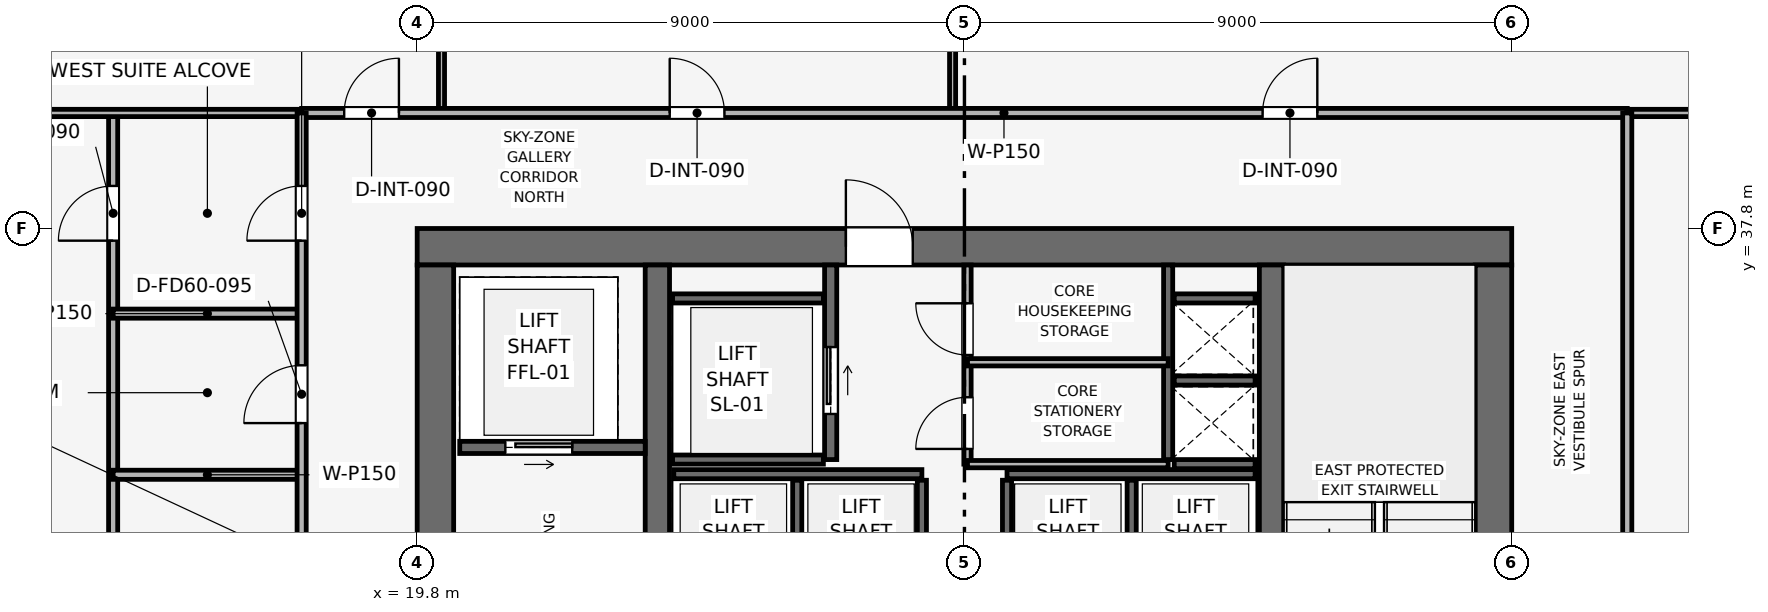
"""IFC4 building model, lengths in metres.
Left out: names, types, materials, properties, quantities, classifications, styles, units other than length and angle.
Written with IfcOpenShell. Run it as: python <this file> out.ifc"""

import sys

from ifc_helpers import new_model, si_unit, direction, frame, frame_2d, origin, place, context, subcontext, project, spatial, rectangle, extrude, element, fill, save


model = new_model("IFC4")
c1 = context("Model", 3, precision=1e-05, world=origin(), true_north=direction((0.0, 1.0)))
c2 = subcontext(c1, "Body", "Model", "MODEL_VIEW")
j1 = project(units=[si_unit("LENGTHUNIT", "METRE"), si_unit("PLANEANGLEUNIT", "RADIAN")], contexts=[c1])
p1 = place(None, origin())
s1 = spatial("IfcSite", under=j1, at=p1, CompositionType="ELEMENT")
p2 = place(p1, origin())
s2 = spatial("IfcBuilding", under=s1, at=p2, CompositionType="ELEMENT")
p3 = place(p2, frame((0.0, 0.0, 329.25)))
s3 = spatial("IfcBuildingStorey", under=s2, at=p3, CompositionType="ELEMENT", Elevation=329.25)
p4 = place(p3, frame((19.8, 37.5, 0.0), z_axis=(0.0, 0.0, 1.0), x_axis=(1.0, 0.0, 0.0)))
e1 = element("IfcWall", 1, at=p4, inside=s3, PredefinedType="SHEAR", context=c2, shape_type="SweptSolid", body=[
    extrude(rectangle(XDim=18.0, YDim=0.6, at=frame_2d((9.0, 0.0))), origin(), (0.0, 0.0, 1.0), 3.75),
])
p5 = place(p4, frame((7.05, 0.0, 0.0)))
e2 = element("IfcOpeningElement", 2, at=p5, cuts=e1, PredefinedType="OPENING", context=c2, shape_type="SweptSolid", body=[
    extrude(rectangle(XDim=1.1, YDim=2.15, at=frame_2d((0.55, 1.075))), frame((0.0, 0.31, 0.0), z_axis=(0.0, -1.0, 0.0), x_axis=(1.0, 0.0, 0.0)), (0.0, 0.0, 1.0), 0.62),
])
p6 = place(p3, frame((20.1, 20.4, 0.0), z_axis=(0.0, 0.0, 1.0), x_axis=(0.0, 1.0, 0.0)))
e3 = element("IfcWall", 3, at=p6, inside=s3, PredefinedType="SHEAR", context=c2, shape_type="SweptSolid", body=[
    extrude(rectangle(XDim=16.8, YDim=0.6, at=frame_2d((8.4, 0.0))), origin(), (0.0, 0.0, 1.0), 3.75),
])
p7 = place(p6, frame((10.4, 0.0, 0.0)))
e4 = element("IfcOpeningElement", 4, at=p7, cuts=e3, PredefinedType="OPENING", context=c2, shape_type="SweptSolid", body=[
    extrude(rectangle(XDim=1.1, YDim=2.15, at=frame_2d((0.55, 1.075))), frame((0.0, 0.31, 0.0), z_axis=(0.0, -1.0, 0.0), x_axis=(1.0, 0.0, 0.0)), (0.0, 0.0, 1.0), 0.62),
])
p8 = place(p3, frame((37.5, 20.4, 0.0), z_axis=(0.0, 0.0, 1.0), x_axis=(0.0, 1.0, 0.0)))
e5 = element("IfcWall", 5, at=p8, inside=s3, PredefinedType="SHEAR", context=c2, shape_type="SweptSolid", body=[
    extrude(rectangle(XDim=16.8, YDim=0.6, at=frame_2d((8.4, 0.0))), origin(), (0.0, 0.0, 1.0), 3.75),
])
p9 = place(p8, frame((4.9, 0.0, 0.0)))
e6 = element("IfcOpeningElement", 6, at=p9, cuts=e5, PredefinedType="OPENING", context=c2, shape_type="SweptSolid", body=[
    extrude(rectangle(XDim=1.1, YDim=2.15, at=frame_2d((0.55, 1.075))), frame((0.0, 0.31, 0.0), z_axis=(0.0, -1.0, 0.0), x_axis=(1.0, 0.0, 0.0)), (0.0, 0.0, 1.0), 0.62),
])
for number, where, z_axis, x_axis in (
    (7, (23.75, 20.4, 0.0), (0.0, 0.0, 1.0), (0.0, 1.0, 0.0)),
    (8, (33.85, 20.4, 0.0), (0.0, 0.0, 1.0), (0.0, 1.0, 0.0)),
):
    element("IfcWall", number, at=place(p3, frame(where, z_axis=z_axis, x_axis=x_axis)), inside=s3, PredefinedType="SHEAR", context=c2, shape_type="SweptSolid", body=[
        extrude(rectangle(XDim=16.8, YDim=0.4, at=frame_2d((8.4, 0.0))), origin(), (0.0, 0.0, 1.0), 3.75),
    ])
p10 = place(p3, frame((32.15, 34.0, 0.0), z_axis=(0.0, 0.0, 1.0), x_axis=(0.0, 1.0, 0.0)))
e9 = element("IfcWall", 9, at=p10, inside=s3, PredefinedType="SHEAR", context=c2, shape_type="SweptSolid", body=[
    extrude(rectangle(XDim=3.2, YDim=0.15, at=frame_2d((1.6, 0.0))), origin(), (0.0, 0.0, 1.0), 3.51),
])
for number, where, z_axis, x_axis in (
    (10, (32.25, 33.925, 0.0), (0.0, 0.0, 1.0), (1.0, 0.0, 0.0)),
    (11, (32.25, 35.3, 0.0), (0.0, 0.0, 1.0), (1.0, 0.0, 0.0)),
):
    element("IfcWall", number, at=place(p3, frame(where, z_axis=z_axis, x_axis=x_axis)), inside=s3, PredefinedType="SHEAR", context=c2, shape_type="SweptSolid", body=[
        extrude(rectangle(XDim=1.33, YDim=0.15, at=frame_2d((0.665, 0.0))), origin(), (0.0, 0.0, 1.0), 3.51),
    ])
p11 = place(p3, frame((20.5, 34.2, 0.0), z_axis=(0.0, 0.0, 1.0), x_axis=(1.0, 0.0, 0.0)))
e12 = element("IfcWall", 12, at=p11, inside=s3, PredefinedType="SHEAR", context=c2, shape_type="SweptSolid", body=[
    extrude(rectangle(XDim=3.05, YDim=0.2, at=frame_2d((1.525, 0.0))), origin(), (0.0, 0.0, 1.0), 3.51),
])
p12 = place(p11, frame((0.75, 0.0, 0.0)))
e13 = element("IfcOpeningElement", 13, at=p12, cuts=e12, PredefinedType="OPENING", context=c2, shape_type="SweptSolid", body=[
    extrude(rectangle(XDim=1.1, YDim=2.15, at=frame_2d((0.55, 1.075))), frame((0.0, 0.11, 0.0), z_axis=(0.0, -1.0, 0.0), x_axis=(1.0, 0.0, 0.0)), (0.0, 0.0, 1.0), 0.22),
])
p13 = place(p3, frame((26.6, 34.0, 0.0), z_axis=(0.0, 0.0, 1.0), x_axis=(0.0, 1.0, 0.0)))
e14 = element("IfcWall", 14, at=p13, inside=s3, PredefinedType="SHEAR", context=c2, shape_type="SweptSolid", body=[
    extrude(rectangle(XDim=3.2, YDim=0.2, at=frame_2d((1.6, 0.0))), origin(), (0.0, 0.0, 1.0), 3.51),
])
p14 = place(p13, frame((0.75, 0.0, 0.0)))
e15 = element("IfcOpeningElement", 15, at=p14, cuts=e14, PredefinedType="OPENING", context=c2, shape_type="SweptSolid", body=[
    extrude(rectangle(XDim=1.1, YDim=2.15, at=frame_2d((0.55, 1.075))), frame((0.0, 0.11, 0.0), z_axis=(0.0, -1.0, 0.0), x_axis=(1.0, 0.0, 0.0)), (0.0, 0.0, 1.0), 0.22),
])
for number, where, z_axis, x_axis in (
    (16, (24.0, 34.0, 0.0), (0.0, 0.0, 1.0), (1.0, 0.0, 0.0)),
    (17, (24.0, 36.65, 0.0), (0.0, 0.0, 1.0), (1.0, 0.0, 0.0)),
):
    element("IfcWall", number, at=place(p3, frame(where, z_axis=z_axis, x_axis=x_axis)), inside=s3, PredefinedType="SHEAR", context=c2, shape_type="SweptSolid", body=[
        extrude(rectangle(XDim=2.48, YDim=0.15, at=frame_2d((1.24, 0.0))), origin(), (0.0, 0.0, 1.0), 3.51),
    ])
p15 = place(p3, frame((32.25, 36.65, 0.0), z_axis=(0.0, 0.0, 1.0), x_axis=(1.0, 0.0, 0.0)))
e18 = element("IfcWall", 18, at=p15, inside=s3, PredefinedType="SHEAR", context=c2, shape_type="SweptSolid", body=[
    extrude(rectangle(XDim=1.33, YDim=0.15, at=frame_2d((0.665, 0.0))), origin(), (0.0, 0.0, 1.0), 3.51),
])
for number, where, z_axis, x_axis in (
    (19, (24.02, 33.76, 0.0), (0.0, 0.0, 1.0), (1.0, 0.0, 0.0)),
    (20, (29.5, 33.76, 0.0), (0.0, 0.0, 1.0), (1.0, 0.0, 0.0)),
):
    element("IfcWall", number, at=place(p3, frame(where, z_axis=z_axis, x_axis=x_axis)), inside=s3, PredefinedType="SHEAR", context=c2, shape_type="SweptSolid", body=[
        extrude(rectangle(XDim=4.08, YDim=0.15, at=frame_2d((2.04, 0.0))), origin(), (0.0, 0.0, 1.0), 3.51),
    ])
for number, where, z_axis, x_axis in (
    (21, (26.05, 31.42, 0.0), (0.0, 0.0, 1.0), (0.0, 1.0, 0.0)),
    (22, (28.1, 31.42, 0.0), (0.0, 0.0, 1.0), (0.0, 1.0, 0.0)),
    (23, (29.5, 31.42, 0.0), (0.0, 0.0, 1.0), (0.0, 1.0, 0.0)),
    (24, (31.55, 31.42, 0.0), (0.0, 0.0, 1.0), (0.0, 1.0, 0.0)),
):
    element("IfcWall", number, at=place(p3, frame(where, z_axis=z_axis, x_axis=x_axis)), inside=s3, PredefinedType="SHEAR", context=c2, shape_type="SweptSolid", body=[
        extrude(rectangle(XDim=2.24, YDim=0.15, at=frame_2d((1.12, 0.0))), origin(), (0.0, 0.0, 1.0), 3.51),
    ])
p16 = place(p3, frame((28.85, 33.925, 0.0), z_axis=(0.0, 0.0, 1.0), x_axis=(0.0, 1.0, 0.0)))
e25 = element("IfcWall", 25, at=p16, inside=s3, PredefinedType="PARTITIONING", context=c2, shape_type="SweptSolid", body=[
    extrude(rectangle(XDim=3.275, YDim=0.12, at=frame_2d((1.637, 0.0))), origin(), (0.0, 0.0, 1.0), 3.51),
])
p17 = place(p16, frame((0.25, 0.0, 0.0)))
e26 = element("IfcOpeningElement", 26, at=p17, cuts=e25, PredefinedType="OPENING", context=c2, shape_type="SweptSolid", body=[
    extrude(rectangle(XDim=0.85, YDim=2.1, at=frame_2d((0.425, 1.05))), frame((0.0, 0.07, 0.0), z_axis=(0.0, -1.0, 0.0), x_axis=(1.0, 0.0, 0.0)), (0.0, 0.0, 1.0), 0.14),
])
p18 = place(p16, frame((1.795, 0.0, 0.0)))
e27 = element("IfcOpeningElement", 27, at=p18, cuts=e25, PredefinedType="OPENING", context=c2, shape_type="SweptSolid", body=[
    extrude(rectangle(XDim=0.85, YDim=2.1, at=frame_2d((0.425, 1.05))), frame((0.0, 0.07, 0.0), z_axis=(0.0, -1.0, 0.0), x_axis=(1.0, 0.0, 0.0)), (0.0, 0.0, 1.0), 0.14),
])
for number, where, z_axis, x_axis in (
    (28, (28.85, 35.6, 0.0), (0.0, 0.0, 1.0), (1.0, 0.0, 0.0)),
    (29, (28.85, 33.925, 0.0), (0.0, 0.0, 1.0), (1.0, 0.0, 0.0)),
):
    element("IfcWall", number, at=place(p3, frame(where, z_axis=z_axis, x_axis=x_axis)), inside=s3, PredefinedType="PARTITIONING", context=c2, shape_type="SweptSolid", body=[
        extrude(rectangle(XDim=3.3, YDim=0.12, at=frame_2d((1.65, 0.0))), origin(), (0.0, 0.0, 1.0), 3.51),
    ])
for number, where, z_axis, x_axis in (
    (30, (20.2, 39.7, 0.0), (0.0, 0.0, 1.0), (0.0, 1.0, 0.0)),
    (31, (28.605, 39.7, 0.0), (0.0, 0.0, 1.0), (0.0, 1.0, 0.0)),
):
    element("IfcWall", number, at=place(p3, frame(where, z_axis=z_axis, x_axis=x_axis)), inside=s3, PredefinedType="MOVABLE", context=c2, shape_type="SweptSolid", body=[
        extrude(rectangle(XDim=11.77, YDim=0.1, at=frame_2d((5.885, 0.0))), origin(), (0.0, 0.0, 1.0), 3.095),
    ])
p19 = place(p3, frame((14.8, 28.0, 0.0), z_axis=(0.0, 0.0, 1.0), x_axis=(0.0, 1.0, 0.0)))
e32 = element("IfcWall", 32, at=p19, inside=s3, PredefinedType="PARTITIONING", context=c2, shape_type="SweptSolid", body=[
    extrude(rectangle(XDim=11.7, YDim=0.15, at=frame_2d((5.85, 0.0))), origin(), (0.0, 0.0, 1.0), 3.095),
])
p20 = place(p19, frame((9.6, 0.0, 0.0)))
e33 = element("IfcOpeningElement", 33, at=p20, cuts=e32, PredefinedType="OPENING", context=c2, shape_type="SweptSolid", body=[
    extrude(rectangle(XDim=0.9, YDim=2.1, at=frame_2d((0.45, 1.05))), frame((0.0, 0.085, 0.0), z_axis=(0.0, -1.0, 0.0), x_axis=(1.0, 0.0, 0.0)), (0.0, 0.0, 1.0), 0.17),
])
for number, where, z_axis, x_axis in (
    (34, (14.8, 36.4, 0.0), (0.0, 0.0, 1.0), (1.0, 0.0, 0.0)),
    (35, (14.8, 33.75, 0.0), (0.0, 0.0, 1.0), (1.0, 0.0, 0.0)),
):
    element("IfcWall", number, at=place(p3, frame(where, z_axis=z_axis, x_axis=x_axis)), inside=s3, PredefinedType="PARTITIONING", context=c2, shape_type="SweptSolid", body=[
        extrude(rectangle(XDim=3.1, YDim=0.15, at=frame_2d((1.55, 0.0))), origin(), (0.0, 0.0, 1.0), 3.135),
    ])
for number, where, z_axis, x_axis in (
    (36, (6.13, 39.7, 0.0), (0.0, 0.0, 1.0), (1.0, 0.0, 0.0)),
    (37, (39.7, 39.7, 0.0), (0.0, 0.0, 1.0), (1.0, 0.0, 0.0)),
):
    element("IfcWall", number, at=place(p3, frame(where, z_axis=z_axis, x_axis=x_axis)), inside=s3, PredefinedType="PARTITIONING", context=c2, shape_type="SweptSolid", body=[
        extrude(rectangle(XDim=11.77, YDim=0.12, at=frame_2d((5.885, 0.0))), origin(), (0.0, 0.0, 1.0), 3.095),
    ])
p21 = place(p3, frame((17.9, 39.7, 0.0), z_axis=(0.0, 0.0, 1.0), x_axis=(1.0, 0.0, 0.0)))
e38 = element("IfcWall", 38, at=p21, inside=s3, PredefinedType="PARTITIONING", context=c2, shape_type="SweptSolid", body=[
    extrude(rectangle(XDim=21.8, YDim=0.15, at=frame_2d((10.9, 0.0))), origin(), (0.0, 0.0, 1.0), 3.095),
])
p22 = place(p21, frame((0.7, 0.0, 0.0)))
e39 = element("IfcOpeningElement", 39, at=p22, cuts=e38, PredefinedType="OPENING", context=c2, shape_type="SweptSolid", body=[
    extrude(rectangle(XDim=0.9, YDim=2.1, at=frame_2d((0.45, 1.05))), frame((0.0, 0.085, 0.0), z_axis=(0.0, -1.0, 0.0), x_axis=(1.0, 0.0, 0.0)), (0.0, 0.0, 1.0), 0.17),
])
p23 = place(p21, frame((6.053, 0.0, 0.0)))
e40 = element("IfcOpeningElement", 40, at=p23, cuts=e38, PredefinedType="OPENING", context=c2, shape_type="SweptSolid", body=[
    extrude(rectangle(XDim=0.9, YDim=2.1, at=frame_2d((0.45, 1.05))), frame((0.0, 0.085, 0.0), z_axis=(0.0, -1.0, 0.0), x_axis=(1.0, 0.0, 0.0)), (0.0, 0.0, 1.0), 0.17),
])
p24 = place(p21, frame((15.803, 0.0, 0.0)))
e41 = element("IfcOpeningElement", 41, at=p24, cuts=e38, PredefinedType="OPENING", context=c2, shape_type="SweptSolid", body=[
    extrude(rectangle(XDim=0.9, YDim=2.1, at=frame_2d((0.45, 1.05))), frame((0.0, 0.085, 0.0), z_axis=(0.0, -1.0, 0.0), x_axis=(1.0, 0.0, 0.0)), (0.0, 0.0, 1.0), 0.17),
])
p25 = place(p3, frame((17.9, 12.3, 0.0), z_axis=(0.0, 0.0, 1.0), x_axis=(0.0, 1.0, 0.0)))
e42 = element("IfcWall", 42, at=p25, inside=s3, PredefinedType="PARTITIONING", context=c2, shape_type="SweptSolid", body=[
    extrude(rectangle(XDim=27.4, YDim=0.15, at=frame_2d((13.7, 0.0))), origin(), (0.0, 0.0, 1.0), 3.095),
])
p26 = place(p25, frame((2.365, 0.0, 0.0)))
e43 = element("IfcOpeningElement", 43, at=p26, cuts=e42, PredefinedType="OPENING", context=c2, shape_type="SweptSolid", body=[
    extrude(rectangle(XDim=0.9, YDim=2.1, at=frame_2d((0.45, 1.05))), frame((0.0, 0.085, 0.0), z_axis=(0.0, -1.0, 0.0), x_axis=(1.0, 0.0, 0.0)), (0.0, 0.0, 1.0), 0.17),
])
p27 = place(p25, frame((10.215, 0.0, 0.0)))
e44 = element("IfcOpeningElement", 44, at=p27, cuts=e42, PredefinedType="OPENING", context=c2, shape_type="SweptSolid", body=[
    extrude(rectangle(XDim=0.9, YDim=2.1, at=frame_2d((0.45, 1.05))), frame((0.0, 0.085, 0.0), z_axis=(0.0, -1.0, 0.0), x_axis=(1.0, 0.0, 0.0)), (0.0, 0.0, 1.0), 0.17),
])
p28 = place(p25, frame((16.65, 0.0, 0.0)))
e45 = element("IfcOpeningElement", 45, at=p28, cuts=e42, PredefinedType="OPENING", context=c2, shape_type="SweptSolid", body=[
    extrude(rectangle(XDim=0.9, YDim=2.1, at=frame_2d((0.45, 1.05))), frame((0.0, 0.085, 0.0), z_axis=(0.0, -1.0, 0.0), x_axis=(1.0, 0.0, 0.0)), (0.0, 0.0, 1.0), 0.17),
])
p29 = place(p25, frame((19.55, 0.0, 0.0)))
e46 = element("IfcOpeningElement", 46, at=p29, cuts=e42, PredefinedType="OPENING", context=c2, shape_type="SweptSolid", body=[
    extrude(rectangle(XDim=0.9, YDim=2.1, at=frame_2d((0.45, 1.05))), frame((0.0, 0.085, 0.0), z_axis=(0.0, -1.0, 0.0), x_axis=(1.0, 0.0, 0.0)), (0.0, 0.0, 1.0), 0.17),
])
p30 = place(p25, frame((22.3, 0.0, 0.0)))
e47 = element("IfcOpeningElement", 47, at=p30, cuts=e42, PredefinedType="OPENING", context=c2, shape_type="SweptSolid", body=[
    extrude(rectangle(XDim=0.95, YDim=2.1, at=frame_2d((0.475, 1.05))), frame((0.0, 0.085, 0.0), z_axis=(0.0, -1.0, 0.0), x_axis=(1.0, 0.0, 0.0)), (0.0, 0.0, 1.0), 0.17),
])
p31 = place(p25, frame((25.3, 0.0, 0.0)))
e48 = element("IfcOpeningElement", 48, at=p31, cuts=e42, PredefinedType="OPENING", context=c2, shape_type="SweptSolid", body=[
    extrude(rectangle(XDim=0.9, YDim=2.1, at=frame_2d((0.45, 1.05))), frame((0.0, 0.085, 0.0), z_axis=(0.0, -1.0, 0.0), x_axis=(1.0, 0.0, 0.0)), (0.0, 0.0, 1.0), 0.17),
])
p32 = place(p3, frame((39.7, 24.4, 0.0), z_axis=(0.0, 0.0, 1.0), x_axis=(0.0, 1.0, 0.0)))
e49 = element("IfcWall", 49, at=p32, inside=s3, PredefinedType="PARTITIONING", context=c2, shape_type="SweptSolid", body=[
    extrude(rectangle(XDim=15.3, YDim=0.15, at=frame_2d((7.65, 0.0))), origin(), (0.0, 0.0, 1.0), 3.095),
])
p33 = place(p32, frame((7.2, 0.0, 0.0)))
e50 = element("IfcOpeningElement", 50, at=p33, cuts=e49, PredefinedType="OPENING", context=c2, shape_type="SweptSolid", body=[
    extrude(rectangle(XDim=0.9, YDim=2.1, at=frame_2d((0.45, 1.05))), frame((0.0, 0.085, 0.0), z_axis=(0.0, -1.0, 0.0), x_axis=(1.0, 0.0, 0.0)), (0.0, 0.0, 1.0), 0.17),
])
p34 = place(p12, origin())
e51 = element("IfcDoor", 51, at=p34, inside=s3, OperationType="SLIDING_TO_RIGHT", PredefinedType="DOOR", context=c2, shape_type="SweptSolid", body=[
    extrude(rectangle(XDim=1.1, YDim=2.15, at=frame_2d((0.55, 1.075))), frame((0.0, 0.025, 0.0), z_axis=(0.0, -1.0, 0.0), x_axis=(1.0, 0.0, 0.0)), (0.0, 0.0, 1.0), 0.05),
])
fill(e13, e51)
p35 = place(p14, origin())
e52 = element("IfcDoor", 52, at=p35, inside=s3, OperationType="SLIDING_TO_RIGHT", PredefinedType="DOOR", context=c2, shape_type="SweptSolid", body=[
    extrude(rectangle(XDim=1.1, YDim=2.15, at=frame_2d((0.55, 1.075))), frame((0.0, 0.025, 0.0), z_axis=(0.0, -1.0, 0.0), x_axis=(1.0, 0.0, 0.0)), (0.0, 0.0, 1.0), 0.05),
])
fill(e15, e52)
p36 = place(p17, origin())
e53 = element("IfcDoor", 53, at=p36, inside=s3, OperationType="SINGLE_SWING_LEFT", PredefinedType="DOOR", context=c2, shape_type="SweptSolid", body=[
    extrude(rectangle(XDim=0.85, YDim=2.1, at=frame_2d((0.425, 1.05))), frame((0.0, 0.025, 0.0), z_axis=(0.0, -1.0, 0.0), x_axis=(1.0, 0.0, 0.0)), (0.0, 0.0, 1.0), 0.05),
])
fill(e26, e53)
p37 = place(p18, origin())
e54 = element("IfcDoor", 54, at=p37, inside=s3, OperationType="SINGLE_SWING_RIGHT", PredefinedType="DOOR", context=c2, shape_type="SweptSolid", body=[
    extrude(rectangle(XDim=0.85, YDim=2.1, at=frame_2d((0.425, 1.05))), frame((0.0, 0.025, 0.0), z_axis=(0.0, -1.0, 0.0), x_axis=(1.0, 0.0, 0.0)), (0.0, 0.0, 1.0), 0.05),
])
fill(e27, e54)
p38 = place(p20, origin())
e55 = element("IfcDoor", 55, at=p38, inside=s3, OperationType="SINGLE_SWING_LEFT", PredefinedType="DOOR", context=c2, shape_type="SweptSolid", body=[
    extrude(rectangle(XDim=0.9, YDim=2.1, at=frame_2d((0.45, 1.05))), frame((0.0, 0.025, 0.0), z_axis=(0.0, -1.0, 0.0), x_axis=(1.0, 0.0, 0.0)), (0.0, 0.0, 1.0), 0.05),
])
fill(e33, e55)
p39 = place(p22, origin())
e56 = element("IfcDoor", 56, at=p39, inside=s3, OperationType="SINGLE_SWING_RIGHT", PredefinedType="DOOR", context=c2, shape_type="SweptSolid", body=[
    extrude(rectangle(XDim=0.9, YDim=2.1, at=frame_2d((0.45, 1.05))), frame((0.0, 0.025, 0.0), z_axis=(0.0, -1.0, 0.0), x_axis=(1.0, 0.0, 0.0)), (0.0, 0.0, 1.0), 0.05),
])
fill(e39, e56)
p40 = place(p23, origin())
e57 = element("IfcDoor", 57, at=p40, inside=s3, OperationType="SINGLE_SWING_LEFT", PredefinedType="DOOR", context=c2, shape_type="SweptSolid", body=[
    extrude(rectangle(XDim=0.9, YDim=2.1, at=frame_2d((0.45, 1.05))), frame((0.0, 0.025, 0.0), z_axis=(0.0, -1.0, 0.0), x_axis=(1.0, 0.0, 0.0)), (0.0, 0.0, 1.0), 0.05),
])
fill(e40, e57)
p41 = place(p24, origin())
e58 = element("IfcDoor", 58, at=p41, inside=s3, OperationType="SINGLE_SWING_RIGHT", PredefinedType="DOOR", context=c2, shape_type="SweptSolid", body=[
    extrude(rectangle(XDim=0.9, YDim=2.1, at=frame_2d((0.45, 1.05))), frame((0.0, 0.025, 0.0), z_axis=(0.0, -1.0, 0.0), x_axis=(1.0, 0.0, 0.0)), (0.0, 0.0, 1.0), 0.05),
])
fill(e41, e58)
p42 = place(p30, origin())
e59 = element("IfcDoor", 59, at=p42, inside=s3, OperationType="SINGLE_SWING_LEFT", PredefinedType="DOOR", context=c2, shape_type="SweptSolid", body=[
    extrude(rectangle(XDim=0.95, YDim=2.1, at=frame_2d((0.475, 1.05))), frame((0.0, 0.025, 0.0), z_axis=(0.0, -1.0, 0.0), x_axis=(1.0, 0.0, 0.0)), (0.0, 0.0, 1.0), 0.05),
])
fill(e47, e59)
p43 = place(p31, origin())
e60 = element("IfcDoor", 60, at=p43, inside=s3, OperationType="SINGLE_SWING_LEFT", PredefinedType="DOOR", context=c2, shape_type="SweptSolid", body=[
    extrude(rectangle(XDim=0.9, YDim=2.1, at=frame_2d((0.45, 1.05))), frame((0.0, 0.025, 0.0), z_axis=(0.0, -1.0, 0.0), x_axis=(1.0, 0.0, 0.0)), (0.0, 0.0, 1.0), 0.05),
])
fill(e48, e60)
p44 = place(p5, origin())
e61 = element("IfcDoor", 61, at=p44, inside=s3, OperationType="SINGLE_SWING_LEFT", PredefinedType="DOOR", context=c2, shape_type="SweptSolid", body=[
    extrude(rectangle(XDim=1.1, YDim=2.15, at=frame_2d((0.55, 1.075))), frame((0.0, 0.025, 0.0), z_axis=(0.0, -1.0, 0.0), x_axis=(1.0, 0.0, 0.0)), (0.0, 0.0, 1.0), 0.05),
])
fill(e2, e61)
save(model, sys.argv[1])
